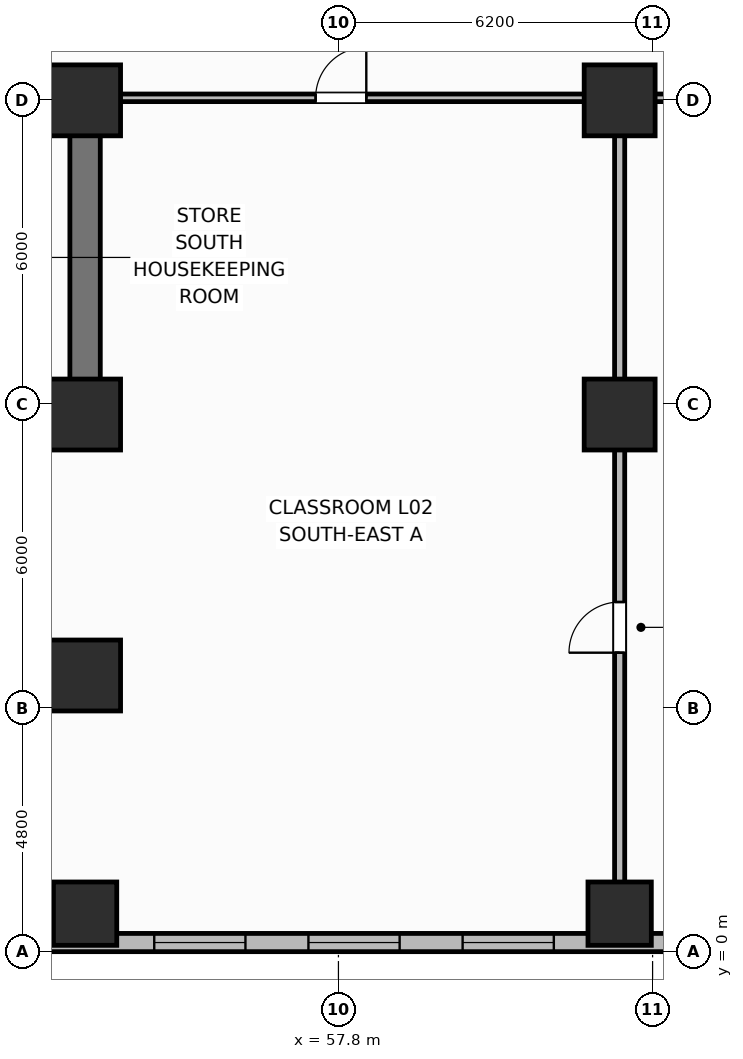
"""IFC4 building model, lengths in metres.
Left out: names, types, materials, properties, quantities, classifications, styles, units other than length and angle.
Written with IfcOpenShell. Run it as: python <this file> out.ifc"""

import sys

from ifc_helpers import new_model, si_unit, direction, frame, frame_2d, origin, origin_2d, place, context, subcontext, project, spatial, rectangle, extrude, element, fill, save


model = new_model("IFC4")
c1 = context("Model", 3, precision=1e-05, world=origin(), true_north=direction((0.0, 1.0)))
c2 = subcontext(c1, "Body", "Model", "MODEL_VIEW")
j1 = project(units=[si_unit("LENGTHUNIT", "METRE"), si_unit("PLANEANGLEUNIT", "RADIAN")], contexts=[c1])
p1 = place(None, origin())
s1 = spatial("IfcSite", under=j1, at=p1, CompositionType="ELEMENT")
p2 = place(p1, origin())
s2 = spatial("IfcBuilding", under=s1, at=p2, CompositionType="ELEMENT")
p3 = place(p2, frame((0.0, 0.0, 11.1)))
s3 = spatial("IfcBuildingStorey", under=s2, at=p3, CompositionType="ELEMENT", Elevation=11.1)
p4 = place(p3, frame((52.8, 10.6, 0.0), z_axis=(0.0, 0.0, 1.0), x_axis=(-1.0, 0.0, 0.0)))
e1 = element("IfcWall", 1, at=p4, inside=s3, PredefinedType="SHEAR", context=c2, shape_type="SweptSolid", body=[
    extrude(rectangle(XDim=27.2, YDim=0.6, at=frame_2d((13.6, 0.0))), origin(), (0.0, 0.0, 1.0), 4.5),
])
p5 = place(p3, frame((52.8, 10.9, 0.0), z_axis=(0.0, 0.0, 1.0), x_axis=(0.0, 1.0, 0.0)))
e2 = element("IfcWall", 2, at=p5, inside=s3, PredefinedType="SHEAR", context=c2, shape_type="SweptSolid", body=[
    extrude(rectangle(XDim=5.6, YDim=0.6, at=frame_2d((2.8, 0.0))), origin(), (0.0, 0.0, 1.0), 4.5),
])
p6 = place(p3, frame((25.6, 16.8, 0.0), z_axis=(0.0, 0.0, 1.0), x_axis=(1.0, 0.0, 0.0)))
e3 = element("IfcWall", 3, at=p6, inside=s3, PredefinedType="SHEAR", context=c2, shape_type="SweptSolid", body=[
    extrude(rectangle(XDim=27.2, YDim=0.6, at=frame_2d((13.6, 0.0))), origin(), (0.0, 0.0, 1.0), 4.5),
])
p7 = place(p6, frame((1.9, 0.0, 0.0)))
e4 = element("IfcOpeningElement", 4, at=p7, cuts=e3, PredefinedType="OPENING", context=c2, shape_type="SweptSolid", body=[
    extrude(rectangle(XDim=1.1, YDim=2.15, at=frame_2d((0.55, 1.075))), frame((0.0, 0.31, 0.0), z_axis=(0.0, -1.0, 0.0), x_axis=(1.0, 0.0, 0.0)), (0.0, 0.0, 1.0), 0.62),
])
p8 = place(p6, frame((13.0, 0.0, 0.0)))
e5 = element("IfcOpeningElement", 5, at=p8, cuts=e3, PredefinedType="OPENING", context=c2, shape_type="SweptSolid", body=[
    extrude(rectangle(XDim=1.2, YDim=2.15, at=frame_2d((0.6, 1.075))), frame((0.0, 0.31, 0.0), z_axis=(0.0, -1.0, 0.0), x_axis=(1.0, 0.0, 0.0)), (0.0, 0.0, 1.0), 0.62),
])
p9 = place(p6, frame((20.4, 0.0, 0.0)))
e6 = element("IfcOpeningElement", 6, at=p9, cuts=e3, PredefinedType="OPENING", context=c2, shape_type="SweptSolid", body=[
    extrude(rectangle(XDim=1.3, YDim=2.2, at=frame_2d((0.65, 1.1))), frame((0.0, 0.31, 0.0), z_axis=(0.0, -1.0, 0.0), x_axis=(1.0, 0.0, 0.0)), (0.0, 0.0, 1.0), 0.62),
])
p10 = place(p6, frame((24.65, 0.0, 0.0)))
e7 = element("IfcOpeningElement", 7, at=p10, cuts=e3, PredefinedType="OPENING", context=c2, shape_type="SweptSolid", body=[
    extrude(rectangle(XDim=0.85, YDim=2.1, at=frame_2d((0.425, 1.05))), frame((0.0, 0.31, 0.0), z_axis=(0.0, -1.0, 0.0), x_axis=(1.0, 0.0, 0.0)), (0.0, 0.0, 1.0), 0.62),
])
for number, where, z_axis, x_axis in (
    (8, (52.8, 10.6, 0.0), (0.0, 0.0, 1.0), (1.0, 0.0, 0.0)),
    (9, (52.8, 16.8, 0.0), (0.0, 0.0, 1.0), (1.0, 0.0, 0.0)),
):
    element("IfcColumn", number, at=place(p3, frame(where, z_axis=z_axis, x_axis=x_axis)), inside=s3, PredefinedType="COLUMN", context=c2, shape_type="SweptSolid", body=[
        extrude(rectangle(XDim=1.4, YDim=1.4, at=origin_2d()), origin(), (0.0, 0.0, 1.0), 4.5),
    ])
for number, where, z_axis, x_axis in (
    (10, (52.8, 0.75, 0.0), (0.0, 0.0, 1.0), (1.0, 0.0, 0.0)),
    (11, (63.35, 0.75, 0.0), (0.0, 0.0, 1.0), (1.0, 0.0, 0.0)),
):
    element("IfcColumn", number, at=place(p3, frame(where, z_axis=z_axis, x_axis=x_axis)), inside=s3, PredefinedType="COLUMN", context=c2, shape_type="SweptSolid", body=[
        extrude(rectangle(XDim=1.25, YDim=1.25, at=origin_2d()), origin(), (0.0, 0.0, 1.0), 4.5),
    ])
for number, where, z_axis, x_axis in (
    (12, (52.8, 5.45, 0.0), (0.0, 0.0, 1.0), (1.0, 0.0, 0.0)),
    (13, (63.35, 10.6, 0.0), (0.0, 0.0, 1.0), (1.0, 0.0, 0.0)),
    (14, (63.35, 16.8, 0.0), (0.0, 0.0, 1.0), (1.0, 0.0, 0.0)),
):
    element("IfcColumn", number, at=place(p3, frame(where, z_axis=z_axis, x_axis=x_axis)), inside=s3, PredefinedType="COLUMN", context=c2, shape_type="SweptSolid", body=[
        extrude(rectangle(XDim=1.4, YDim=1.4, at=origin_2d()), origin(), (0.0, 0.0, 1.0), 4.5),
    ])
p11 = place(p3, frame((21.83, 0.18, 0.0), z_axis=(0.0, 0.0, 1.0), x_axis=(1.0, 0.0, 0.0)))
e15 = element("IfcWall", 15, at=p11, inside=s3, PredefinedType="SOLIDWALL", context=c2, shape_type="SweptSolid", body=[
    extrude(rectangle(XDim=55.59, YDim=0.36, at=frame_2d((27.795, 0.0))), origin(), (0.0, 0.0, 1.0), 3.48),
])
p12 = place(p11, frame((0.747, 0.0, 0.9)))
e16 = element("IfcOpeningElement", 16, at=p12, cuts=e15, PredefinedType="OPENING", context=c2, shape_type="SweptSolid", body=[
    extrude(rectangle(XDim=1.8, YDim=2.1, at=frame_2d((0.9, 1.05))), frame((0.0, 0.19, 0.0), z_axis=(0.0, -1.0, 0.0), x_axis=(1.0, 0.0, 0.0)), (0.0, 0.0, 1.0), 0.38),
])
p13 = place(p11, frame((5.19, 0.0, 0.9)))
e17 = element("IfcOpeningElement", 17, at=p13, cuts=e15, PredefinedType="OPENING", context=c2, shape_type="SweptSolid", body=[
    extrude(rectangle(XDim=1.8, YDim=2.1, at=frame_2d((0.9, 1.05))), frame((0.0, 0.19, 0.0), z_axis=(0.0, -1.0, 0.0), x_axis=(1.0, 0.0, 0.0)), (0.0, 0.0, 1.0), 0.38),
])
p14 = place(p11, frame((8.233, 0.0, 0.9)))
e18 = element("IfcOpeningElement", 18, at=p14, cuts=e15, PredefinedType="OPENING", context=c2, shape_type="SweptSolid", body=[
    extrude(rectangle(XDim=1.8, YDim=2.1, at=frame_2d((0.9, 1.05))), frame((0.0, 0.19, 0.0), z_axis=(0.0, -1.0, 0.0), x_axis=(1.0, 0.0, 0.0)), (0.0, 0.0, 1.0), 0.38),
])
p15 = place(p11, frame((11.626, 0.0, 0.9)))
e19 = element("IfcOpeningElement", 19, at=p15, cuts=e15, PredefinedType="OPENING", context=c2, shape_type="SweptSolid", body=[
    extrude(rectangle(XDim=1.8, YDim=2.1, at=frame_2d((0.9, 1.05))), frame((0.0, 0.19, 0.0), z_axis=(0.0, -1.0, 0.0), x_axis=(1.0, 0.0, 0.0)), (0.0, 0.0, 1.0), 0.38),
])
p16 = place(p11, frame((14.319, 0.0, 0.9)))
e20 = element("IfcOpeningElement", 20, at=p16, cuts=e15, PredefinedType="OPENING", context=c2, shape_type="SweptSolid", body=[
    extrude(rectangle(XDim=1.8, YDim=2.1, at=frame_2d((0.9, 1.05))), frame((0.0, 0.19, 0.0), z_axis=(0.0, -1.0, 0.0), x_axis=(1.0, 0.0, 0.0)), (0.0, 0.0, 1.0), 0.38),
])
p17 = place(p11, frame((18.762, 0.0, 0.9)))
e21 = element("IfcOpeningElement", 21, at=p17, cuts=e15, PredefinedType="OPENING", context=c2, shape_type="SweptSolid", body=[
    extrude(rectangle(XDim=1.8, YDim=2.1, at=frame_2d((0.9, 1.05))), frame((0.0, 0.19, 0.0), z_axis=(0.0, -1.0, 0.0), x_axis=(1.0, 0.0, 0.0)), (0.0, 0.0, 1.0), 0.38),
])
p18 = place(p11, frame((21.805, 0.0, 0.9)))
e22 = element("IfcOpeningElement", 22, at=p18, cuts=e15, PredefinedType="OPENING", context=c2, shape_type="SweptSolid", body=[
    extrude(rectangle(XDim=1.8, YDim=2.1, at=frame_2d((0.9, 1.05))), frame((0.0, 0.19, 0.0), z_axis=(0.0, -1.0, 0.0), x_axis=(1.0, 0.0, 0.0)), (0.0, 0.0, 1.0), 0.38),
])
p19 = place(p11, frame((25.198, 0.0, 0.9)))
e23 = element("IfcOpeningElement", 23, at=p19, cuts=e15, PredefinedType="OPENING", context=c2, shape_type="SweptSolid", body=[
    extrude(rectangle(XDim=1.8, YDim=2.1, at=frame_2d((0.9, 1.05))), frame((0.0, 0.19, 0.0), z_axis=(0.0, -1.0, 0.0), x_axis=(1.0, 0.0, 0.0)), (0.0, 0.0, 1.0), 0.38),
])
p20 = place(p11, frame((27.892, 0.0, 0.9)))
e24 = element("IfcOpeningElement", 24, at=p20, cuts=e15, PredefinedType="OPENING", context=c2, shape_type="SweptSolid", body=[
    extrude(rectangle(XDim=1.8, YDim=2.1, at=frame_2d((0.9, 1.05))), frame((0.0, 0.19, 0.0), z_axis=(0.0, -1.0, 0.0), x_axis=(1.0, 0.0, 0.0)), (0.0, 0.0, 1.0), 0.38),
])
p21 = place(p11, frame((32.335, 0.0, 0.9)))
e25 = element("IfcOpeningElement", 25, at=p21, cuts=e15, PredefinedType="OPENING", context=c2, shape_type="SweptSolid", body=[
    extrude(rectangle(XDim=1.8, YDim=2.1, at=frame_2d((0.9, 1.05))), frame((0.0, 0.19, 0.0), z_axis=(0.0, -1.0, 0.0), x_axis=(1.0, 0.0, 0.0)), (0.0, 0.0, 1.0), 0.38),
])
p22 = place(p11, frame((35.378, 0.0, 0.9)))
e26 = element("IfcOpeningElement", 26, at=p22, cuts=e15, PredefinedType="OPENING", context=c2, shape_type="SweptSolid", body=[
    extrude(rectangle(XDim=1.8, YDim=2.1, at=frame_2d((0.9, 1.05))), frame((0.0, 0.19, 0.0), z_axis=(0.0, -1.0, 0.0), x_axis=(1.0, 0.0, 0.0)), (0.0, 0.0, 1.0), 0.38),
])
p23 = place(p11, frame((38.421, 0.0, 0.9)))
e27 = element("IfcOpeningElement", 27, at=p23, cuts=e15, PredefinedType="OPENING", context=c2, shape_type="SweptSolid", body=[
    extrude(rectangle(XDim=1.8, YDim=2.1, at=frame_2d((0.9, 1.05))), frame((0.0, 0.19, 0.0), z_axis=(0.0, -1.0, 0.0), x_axis=(1.0, 0.0, 0.0)), (0.0, 0.0, 1.0), 0.38),
])
p24 = place(p11, frame((42.864, 0.0, 0.9)))
e28 = element("IfcOpeningElement", 28, at=p24, cuts=e15, PredefinedType="OPENING", context=c2, shape_type="SweptSolid", body=[
    extrude(rectangle(XDim=1.8, YDim=2.1, at=frame_2d((0.9, 1.05))), frame((0.0, 0.19, 0.0), z_axis=(0.0, -1.0, 0.0), x_axis=(1.0, 0.0, 0.0)), (0.0, 0.0, 1.0), 0.38),
])
p25 = place(p11, frame((45.557, 0.0, 0.9)))
e29 = element("IfcOpeningElement", 29, at=p25, cuts=e15, PredefinedType="OPENING", context=c2, shape_type="SweptSolid", body=[
    extrude(rectangle(XDim=1.8, YDim=2.1, at=frame_2d((0.9, 1.05))), frame((0.0, 0.19, 0.0), z_axis=(0.0, -1.0, 0.0), x_axis=(1.0, 0.0, 0.0)), (0.0, 0.0, 1.0), 0.38),
])
p26 = place(p11, frame((52.344, 0.0, 0.9)))
e30 = element("IfcOpeningElement", 30, at=p26, cuts=e15, PredefinedType="OPENING", context=c2, shape_type="SweptSolid", body=[
    extrude(rectangle(XDim=1.8, YDim=2.1, at=frame_2d((0.9, 1.05))), frame((0.0, 0.19, 0.0), z_axis=(0.0, -1.0, 0.0), x_axis=(1.0, 0.0, 0.0)), (0.0, 0.0, 1.0), 0.38),
])
p27 = place(p3, frame((63.35, 0.4, 0.0), z_axis=(0.0, 0.0, 1.0), x_axis=(0.0, 1.0, 0.0)))
e31 = element("IfcWall", 31, at=p27, inside=s3, PredefinedType="PARTITIONING", context=c2, shape_type="SweptSolid", body=[
    extrude(rectangle(XDim=16.4, YDim=0.2, at=frame_2d((8.2, 0.0))), origin(), (0.0, 0.0, 1.0), 3.42),
])
p28 = place(p27, frame((5.5, 0.0, 0.0)))
e32 = element("IfcOpeningElement", 32, at=p28, cuts=e31, PredefinedType="OPENING", context=c2, shape_type="SweptSolid", body=[
    extrude(rectangle(XDim=1.0, YDim=2.15, at=frame_2d((0.5, 1.075))), frame((0.0, 0.11, 0.0), z_axis=(0.0, -1.0, 0.0), x_axis=(1.0, 0.0, 0.0)), (0.0, 0.0, 1.0), 0.22),
])
p29 = place(p3, frame((53.15, 16.85, 0.0), z_axis=(0.0, 0.0, 1.0), x_axis=(1.0, 0.0, 0.0)))
e33 = element("IfcWall", 33, at=p29, inside=s3, PredefinedType="PARTITIONING", context=c2, shape_type="SweptSolid", body=[
    extrude(rectangle(XDim=13.25, YDim=0.15, at=frame_2d((6.625, 0.0))), origin(), (0.0, 0.0, 1.0), 3.42),
])
p30 = place(p29, frame((4.2, 0.0, 0.0)))
e34 = element("IfcOpeningElement", 34, at=p30, cuts=e33, PredefinedType="OPENING", context=c2, shape_type="SweptSolid", body=[
    extrude(rectangle(XDim=1.0, YDim=2.15, at=frame_2d((0.5, 1.075))), frame((0.0, 0.085, 0.0), z_axis=(0.0, -1.0, 0.0), x_axis=(1.0, 0.0, 0.0)), (0.0, 0.0, 1.0), 0.17),
])
p31 = place(p21, origin())
e35 = element("IfcWindow", 35, at=p31, inside=s3, PartitioningType="SINGLE_PANEL", PredefinedType="WINDOW", context=c2, shape_type="SweptSolid", body=[
    extrude(rectangle(XDim=1.8, YDim=2.1, at=frame_2d((0.9, 1.05))), frame((0.0, 0.03, 0.0), z_axis=(0.0, -1.0, 0.0), x_axis=(1.0, 0.0, 0.0)), (0.0, 0.0, 1.0), 0.06),
])
fill(e25, e35)
p32 = place(p22, origin())
e36 = element("IfcWindow", 36, at=p32, inside=s3, PartitioningType="SINGLE_PANEL", PredefinedType="WINDOW", context=c2, shape_type="SweptSolid", body=[
    extrude(rectangle(XDim=1.8, YDim=2.1, at=frame_2d((0.9, 1.05))), frame((0.0, 0.03, 0.0), z_axis=(0.0, -1.0, 0.0), x_axis=(1.0, 0.0, 0.0)), (0.0, 0.0, 1.0), 0.06),
])
fill(e26, e36)
p33 = place(p23, origin())
e37 = element("IfcWindow", 37, at=p33, inside=s3, PartitioningType="SINGLE_PANEL", PredefinedType="WINDOW", context=c2, shape_type="SweptSolid", body=[
    extrude(rectangle(XDim=1.8, YDim=2.1, at=frame_2d((0.9, 1.05))), frame((0.0, 0.03, 0.0), z_axis=(0.0, -1.0, 0.0), x_axis=(1.0, 0.0, 0.0)), (0.0, 0.0, 1.0), 0.06),
])
fill(e27, e37)
p34 = place(p28, origin())
e38 = element("IfcDoor", 38, at=p34, inside=s3, OperationType="SINGLE_SWING_LEFT", PredefinedType="DOOR", context=c2, shape_type="SweptSolid", body=[
    extrude(rectangle(XDim=1.0, YDim=2.15, at=frame_2d((0.5, 1.075))), frame((0.0, 0.025, 0.0), z_axis=(0.0, -1.0, 0.0), x_axis=(1.0, 0.0, 0.0)), (0.0, 0.0, 1.0), 0.05),
])
fill(e32, e38)
p35 = place(p30, origin())
e39 = element("IfcDoor", 39, at=p35, inside=s3, OperationType="SINGLE_SWING_RIGHT", PredefinedType="DOOR", context=c2, shape_type="SweptSolid", body=[
    extrude(rectangle(XDim=1.0, YDim=2.15, at=frame_2d((0.5, 1.075))), frame((0.0, 0.025, 0.0), z_axis=(0.0, -1.0, 0.0), x_axis=(1.0, 0.0, 0.0)), (0.0, 0.0, 1.0), 0.05),
])
fill(e34, e39)
save(model, sys.argv[1])
